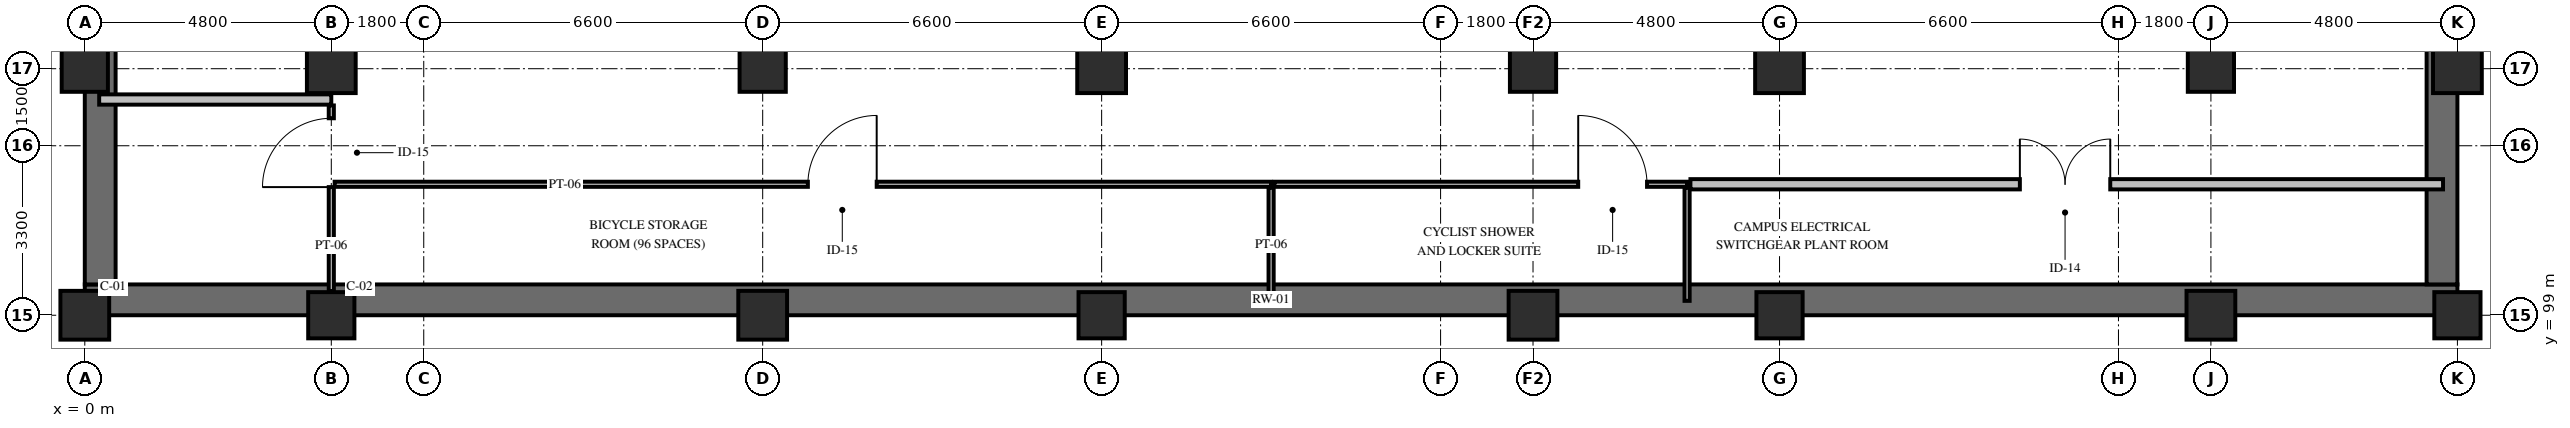
"""IFC4 building model, lengths in metres.
Left out: names, types, materials, properties, quantities, classifications, styles, units other than length and angle.
Written with IfcOpenShell. Run it as: python <this file> out.ifc"""

import sys

from ifc_helpers import new_model, si_unit, direction, frame, frame_2d, origin, origin_2d, place, context, subcontext, project, spatial, rectangle, extrude, element, fill, save


model = new_model("IFC4")
c1 = context("Model", 3, precision=1e-05, world=origin(), true_north=direction((0.0, 1.0)))
c2 = subcontext(c1, "Body", "Model", "MODEL_VIEW")
j1 = project(units=[si_unit("LENGTHUNIT", "METRE"), si_unit("PLANEANGLEUNIT", "RADIAN")], contexts=[c1])
p1 = place(None, origin())
s1 = spatial("IfcSite", under=j1, at=p1, CompositionType="ELEMENT")
p2 = place(p1, origin())
s2 = spatial("IfcBuilding", under=s1, at=p2, CompositionType="ELEMENT")
p3 = place(p2, frame((0.0, 0.0, -5.4)))
s3 = spatial("IfcBuildingStorey", under=s2, at=p3, CompositionType="ELEMENT", Elevation=-5.4)
p4 = place(p3, frame((0.0, 99.3, 0.0), z_axis=(0.0, 0.0, 1.0), x_axis=(1.0, 0.0, 0.0)))
e1 = element("IfcWall", 1, at=p4, inside=s3, PredefinedType="USERDEFINED", context=c2, shape_type="SweptSolid", body=[
    extrude(rectangle(XDim=46.2, YDim=0.6, at=frame_2d((23.1, 0.0))), origin(), (0.0, 0.0, 1.0), 4.96),
])
for number, where, z_axis, x_axis in (
    (2, (0.3, 99.6, 0.0), (0.0, 0.0, 1.0), (0.0, 1.0, 0.0)),
    (3, (45.9, 99.6, 0.0), (0.0, 0.0, 1.0), (0.0, 1.0, 0.0)),
):
    element("IfcWall", number, at=place(p3, frame(where, z_axis=z_axis, x_axis=x_axis)), inside=s3, PredefinedType="USERDEFINED", context=c2, shape_type="SweptSolid", body=[
        extrude(rectangle(XDim=21.9, YDim=0.6, at=frame_2d((10.95, 0.0))), origin(), (0.0, 0.0, 1.0), 4.96),
    ])
p5 = place(p3, frame((0.0, 99.0, 0.0), z_axis=(0.0, 0.0, 1.0), x_axis=(1.0, 0.0, 0.0)))
e4 = element("IfcColumn", 4, at=p5, inside=s3, PredefinedType="COLUMN", context=c2, shape_type="SweptSolid", body=[
    extrude(rectangle(XDim=0.95, YDim=0.95, at=origin_2d()), origin(), (0.0, 0.0, 1.0), 5.4),
])
for number, where, z_axis, x_axis in (
    (5, (0.0, 103.8, 0.0), (0.0, 0.0, 1.0), (1.0, 0.0, 0.0)),
    (6, (4.8, 99.0, 0.0), (0.0, 0.0, 1.0), (1.0, 0.0, 0.0)),
):
    element("IfcColumn", number, at=place(p3, frame(where, z_axis=z_axis, x_axis=x_axis)), inside=s3, PredefinedType="COLUMN", context=c2, shape_type="SweptSolid", body=[
        extrude(rectangle(XDim=0.9, YDim=0.9, at=origin_2d()), origin(), (0.0, 0.0, 1.0), 5.4),
    ])
for number, where, z_axis, x_axis in (
    (7, (4.8, 103.8, 0.0), (0.0, 0.0, 1.0), (1.0, 0.0, 0.0)),
    (8, (13.2, 99.0, 0.0), (0.0, 0.0, 1.0), (1.0, 0.0, 0.0)),
):
    element("IfcColumn", number, at=place(p3, frame(where, z_axis=z_axis, x_axis=x_axis)), inside=s3, PredefinedType="COLUMN", context=c2, shape_type="SweptSolid", body=[
        extrude(rectangle(XDim=0.95, YDim=0.95, at=origin_2d()), origin(), (0.0, 0.0, 1.0), 5.4),
    ])
for number, where, z_axis, x_axis in (
    (9, (13.2, 103.8, 0.0), (0.0, 0.0, 1.0), (1.0, 0.0, 0.0)),
    (10, (19.8, 99.0, 0.0), (0.0, 0.0, 1.0), (1.0, 0.0, 0.0)),
):
    element("IfcColumn", number, at=place(p3, frame(where, z_axis=z_axis, x_axis=x_axis)), inside=s3, PredefinedType="COLUMN", context=c2, shape_type="SweptSolid", body=[
        extrude(rectangle(XDim=0.9, YDim=0.9, at=origin_2d()), origin(), (0.0, 0.0, 1.0), 5.4),
    ])
for number, where, z_axis, x_axis in (
    (11, (19.8, 103.8, 0.0), (0.0, 0.0, 1.0), (1.0, 0.0, 0.0)),
    (12, (28.2, 99.0, 0.0), (0.0, 0.0, 1.0), (1.0, 0.0, 0.0)),
):
    element("IfcColumn", number, at=place(p3, frame(where, z_axis=z_axis, x_axis=x_axis)), inside=s3, PredefinedType="COLUMN", context=c2, shape_type="SweptSolid", body=[
        extrude(rectangle(XDim=0.95, YDim=0.95, at=origin_2d()), origin(), (0.0, 0.0, 1.0), 5.4),
    ])
for number, where, z_axis, x_axis in (
    (13, (28.2, 103.8, 0.0), (0.0, 0.0, 1.0), (1.0, 0.0, 0.0)),
    (14, (33.0, 99.0, 0.0), (0.0, 0.0, 1.0), (1.0, 0.0, 0.0)),
):
    element("IfcColumn", number, at=place(p3, frame(where, z_axis=z_axis, x_axis=x_axis)), inside=s3, PredefinedType="COLUMN", context=c2, shape_type="SweptSolid", body=[
        extrude(rectangle(XDim=0.9, YDim=0.9, at=origin_2d()), origin(), (0.0, 0.0, 1.0), 5.4),
    ])
for number, where, z_axis, x_axis in (
    (15, (33.0, 103.8, 0.0), (0.0, 0.0, 1.0), (1.0, 0.0, 0.0)),
    (16, (41.4, 99.0, 0.0), (0.0, 0.0, 1.0), (1.0, 0.0, 0.0)),
):
    element("IfcColumn", number, at=place(p3, frame(where, z_axis=z_axis, x_axis=x_axis)), inside=s3, PredefinedType="COLUMN", context=c2, shape_type="SweptSolid", body=[
        extrude(rectangle(XDim=0.95, YDim=0.95, at=origin_2d()), origin(), (0.0, 0.0, 1.0), 5.4),
    ])
for number, where, z_axis, x_axis in (
    (17, (41.4, 103.8, 0.0), (0.0, 0.0, 1.0), (1.0, 0.0, 0.0)),
    (18, (46.2, 99.0, 0.0), (0.0, 0.0, 1.0), (1.0, 0.0, 0.0)),
):
    element("IfcColumn", number, at=place(p3, frame(where, z_axis=z_axis, x_axis=x_axis)), inside=s3, PredefinedType="COLUMN", context=c2, shape_type="SweptSolid", body=[
        extrude(rectangle(XDim=0.9, YDim=0.9, at=origin_2d()), origin(), (0.0, 0.0, 1.0), 5.4),
    ])
p6 = place(p3, frame((46.2, 103.8, 0.0), z_axis=(0.0, 0.0, 1.0), x_axis=(1.0, 0.0, 0.0)))
e19 = element("IfcColumn", 19, at=p6, inside=s3, PredefinedType="COLUMN", context=c2, shape_type="SweptSolid", body=[
    extrude(rectangle(XDim=0.95, YDim=0.95, at=origin_2d()), origin(), (0.0, 0.0, 1.0), 5.4),
])
p7 = place(p3, frame((0.28, 103.2, 0.0), z_axis=(0.0, 0.0, 1.0), x_axis=(1.0, 0.0, 0.0)))
e20 = element("IfcWall", 20, at=p7, inside=s3, PredefinedType="PARTITIONING", context=c2, shape_type="SweptSolid", body=[
    extrude(rectangle(XDim=4.52, YDim=0.2, at=frame_2d((2.26, 0.0))), origin(), (0.0, 0.0, 1.0), 4.73),
])
p8 = place(p3, frame((4.8, 99.47, 0.0), z_axis=(0.0, 0.0, 1.0), x_axis=(0.0, 1.0, 0.0)))
e21 = element("IfcWall", 21, at=p8, inside=s3, PredefinedType="PARTITIONING", context=c2, shape_type="SweptSolid", body=[
    extrude(rectangle(XDim=3.615, YDim=0.1, at=frame_2d((1.808, 0.0))), origin(), (0.0, 0.0, 1.0), 4.73),
])
p9 = place(p8, frame((2.025, 0.0, 0.0)))
e22 = element("IfcOpeningElement", 22, at=p9, cuts=e21, PredefinedType="OPENING", context=c2, shape_type="SweptSolid", body=[
    extrude(rectangle(XDim=1.34, YDim=2.2, at=frame_2d((0.67, 1.1))), frame((0.0, 0.065, 0.0), z_axis=(0.0, -1.0, 0.0), x_axis=(1.0, 0.0, 0.0)), (0.0, 0.0, 1.0), 0.13),
])
p10 = place(p3, frame((4.865, 101.55, 0.0), z_axis=(0.0, 0.0, 1.0), x_axis=(1.0, 0.0, 0.0)))
e23 = element("IfcWall", 23, at=p10, inside=s3, PredefinedType="PARTITIONING", context=c2, shape_type="SweptSolid", body=[
    extrude(rectangle(XDim=18.235, YDim=0.1, at=frame_2d((9.118, 0.0))), origin(), (0.0, 0.0, 1.0), 4.73),
])
p11 = place(p10, frame((9.215, 0.0, 0.0)))
e24 = element("IfcOpeningElement", 24, at=p11, cuts=e23, PredefinedType="OPENING", context=c2, shape_type="SweptSolid", body=[
    extrude(rectangle(XDim=1.34, YDim=2.2, at=frame_2d((0.67, 1.1))), frame((0.0, 0.065, 0.0), z_axis=(0.0, -1.0, 0.0), x_axis=(1.0, 0.0, 0.0)), (0.0, 0.0, 1.0), 0.13),
])
p12 = place(p3, frame((23.1, 99.28, 0.0), z_axis=(0.0, 0.0, 1.0), x_axis=(0.0, 1.0, 0.0)))
e25 = element("IfcWall", 25, at=p12, inside=s3, PredefinedType="PARTITIONING", context=c2, shape_type="SweptSolid", body=[
    extrude(rectangle(XDim=2.205, YDim=0.1, at=frame_2d((1.103, 0.0))), origin(), (0.0, 0.0, 1.0), 4.96),
])
p13 = place(p3, frame((23.165, 101.55, 0.0), z_axis=(0.0, 0.0, 1.0), x_axis=(1.0, 0.0, 0.0)))
e26 = element("IfcWall", 26, at=p13, inside=s3, PredefinedType="PARTITIONING", context=c2, shape_type="SweptSolid", body=[
    extrude(rectangle(XDim=8.035, YDim=0.1, at=frame_2d((4.018, 0.0))), origin(), (0.0, 0.0, 1.0), 4.73),
])
p14 = place(p13, frame((5.915, 0.0, 0.0)))
e27 = element("IfcOpeningElement", 27, at=p14, cuts=e26, PredefinedType="OPENING", context=c2, shape_type="SweptSolid", body=[
    extrude(rectangle(XDim=1.34, YDim=2.2, at=frame_2d((0.67, 1.1))), frame((0.0, 0.065, 0.0), z_axis=(0.0, -1.0, 0.0), x_axis=(1.0, 0.0, 0.0)), (0.0, 0.0, 1.0), 0.13),
])
p15 = place(p3, frame((31.2, 99.28, 0.0), z_axis=(0.0, 0.0, 1.0), x_axis=(0.0, 1.0, 0.0)))
e28 = element("IfcWall", 28, at=p15, inside=s3, PredefinedType="PARTITIONING", context=c2, shape_type="SweptSolid", body=[
    extrude(rectangle(XDim=2.205, YDim=0.1, at=frame_2d((1.103, 0.0))), origin(), (0.0, 0.0, 1.0), 4.96),
])
p16 = place(p3, frame((31.265, 101.55, 0.0), z_axis=(0.0, 0.0, 1.0), x_axis=(1.0, 0.0, 0.0)))
e29 = element("IfcWall", 29, at=p16, inside=s3, PredefinedType="PARTITIONING", context=c2, shape_type="SweptSolid", body=[
    extrude(rectangle(XDim=14.655, YDim=0.2, at=frame_2d((7.328, 0.0))), origin(), (0.0, 0.0, 1.0), 4.73),
])
p17 = place(p16, frame((6.415, 0.0, 0.0)))
e30 = element("IfcOpeningElement", 30, at=p17, cuts=e29, PredefinedType="OPENING", context=c2, shape_type="SweptSolid", body=[
    extrude(rectangle(XDim=1.76, YDim=2.35, at=frame_2d((0.88, 1.175))), frame((0.0, 0.115, 0.0), z_axis=(0.0, -1.0, 0.0), x_axis=(1.0, 0.0, 0.0)), (0.0, 0.0, 1.0), 0.23),
])
p18 = place(p9, origin())
e31 = element("IfcDoor", 31, at=p18, inside=s3, OperationType="SINGLE_SWING_LEFT", PredefinedType="DOOR", context=c2, shape_type="SweptSolid", body=[
    extrude(rectangle(XDim=1.34, YDim=2.2, at=frame_2d((0.67, 1.1))), frame((0.0, 0.025, 0.0), z_axis=(0.0, -1.0, 0.0), x_axis=(1.0, 0.0, 0.0)), (0.0, 0.0, 1.0), 0.05),
])
fill(e22, e31)
p19 = place(p11, origin())
e32 = element("IfcDoor", 32, at=p19, inside=s3, OperationType="SINGLE_SWING_RIGHT", PredefinedType="DOOR", context=c2, shape_type="SweptSolid", body=[
    extrude(rectangle(XDim=1.34, YDim=2.2, at=frame_2d((0.67, 1.1))), frame((0.0, 0.025, 0.0), z_axis=(0.0, -1.0, 0.0), x_axis=(1.0, 0.0, 0.0)), (0.0, 0.0, 1.0), 0.05),
])
fill(e24, e32)
p20 = place(p14, origin())
e33 = element("IfcDoor", 33, at=p20, inside=s3, OperationType="SINGLE_SWING_LEFT", PredefinedType="DOOR", context=c2, shape_type="SweptSolid", body=[
    extrude(rectangle(XDim=1.34, YDim=2.2, at=frame_2d((0.67, 1.1))), frame((0.0, 0.025, 0.0), z_axis=(0.0, -1.0, 0.0), x_axis=(1.0, 0.0, 0.0)), (0.0, 0.0, 1.0), 0.05),
])
fill(e27, e33)
p21 = place(p17, origin())
e34 = element("IfcDoor", 34, at=p21, inside=s3, OperationType="DOUBLE_DOOR_SINGLE_SWING", PredefinedType="DOOR", context=c2, shape_type="SweptSolid", body=[
    extrude(rectangle(XDim=1.76, YDim=2.35, at=frame_2d((0.88, 1.175))), frame((0.0, 0.025, 0.0), z_axis=(0.0, -1.0, 0.0), x_axis=(1.0, 0.0, 0.0)), (0.0, 0.0, 1.0), 0.05),
])
fill(e30, e34)
save(model, sys.argv[1])
